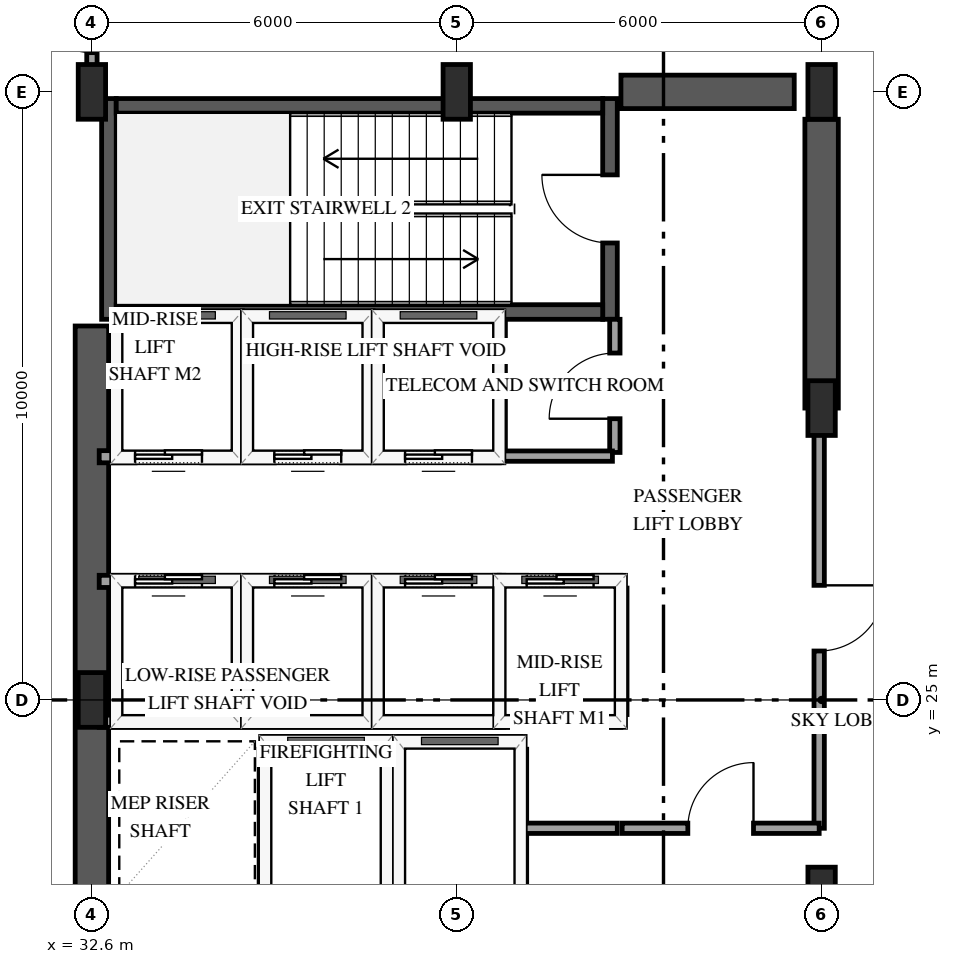
"""IFC4 building model, lengths in metres.
Left out: names, types, materials, properties, quantities, classifications, styles, units other than length and angle.
Written with IfcOpenShell. Run it as: python <this file> out.ifc"""

import sys

from ifc_helpers import new_model, si_unit, direction, frame, frame_2d, origin, origin_2d, place, context, subcontext, project, spatial, rectangle, extrude, element, fill, save


model = new_model("IFC4")
c1 = context("Model", 3, precision=1e-05, world=origin(), true_north=direction((0.0, 1.0)))
c2 = subcontext(c1, "Body", "Model", "MODEL_VIEW")
j1 = project(units=[si_unit("LENGTHUNIT", "METRE"), si_unit("PLANEANGLEUNIT", "RADIAN")], contexts=[c1])
p1 = place(None, origin())
s1 = spatial("IfcSite", under=j1, at=p1, CompositionType="ELEMENT")
p2 = place(p1, origin())
s2 = spatial("IfcBuilding", under=s1, at=p2, CompositionType="ELEMENT")
p3 = place(p2, frame((0.0, 0.0, 134.2)))
s3 = spatial("IfcBuildingStorey", under=s2, at=p3, CompositionType="ELEMENT", Elevation=134.2)
p4 = place(p3, frame((32.88, 31.26, 0.0), z_axis=(0.0, 0.0, 1.0), x_axis=(0.0, 1.0, 0.0)))
e1 = element("IfcWall", 1, at=p4, inside=s3, PredefinedType="SHEAR", context=c2, shape_type="SweptSolid", body=[
    extrude(rectangle(XDim=3.63, YDim=0.24, at=frame_2d((1.815, 0.0))), origin(), (0.0, 0.0, 1.0), 4.8),
])
p5 = place(p3, frame((41.12, 31.26, 0.0), z_axis=(0.0, 0.0, 1.0), x_axis=(0.0, 1.0, 0.0)))
e2 = element("IfcWall", 2, at=p5, inside=s3, PredefinedType="SHEAR", context=c2, shape_type="SweptSolid", body=[
    extrude(rectangle(XDim=3.63, YDim=0.24, at=frame_2d((1.815, 0.0))), origin(), (0.0, 0.0, 1.0), 4.8),
])
p6 = place(p5, frame((1.255, 0.0, 0.0)))
e3 = element("IfcOpeningElement", 3, at=p6, cuts=e2, PredefinedType="OPENING", context=c2, shape_type="SweptSolid", body=[
    extrude(rectangle(XDim=1.12, YDim=2.15, at=frame_2d((0.56, 1.075))), frame((0.0, 0.13, 0.0), z_axis=(0.0, -1.0, 0.0), x_axis=(1.0, 0.0, 0.0)), (0.0, 0.0, 1.0), 0.26),
])
for number, where, z_axis, x_axis in (
    (4, (33.0, 31.38, 0.0), (0.0, 0.0, 1.0), (1.0, 0.0, 0.0)),
    (5, (33.0, 34.77, 0.0), (0.0, 0.0, 1.0), (1.0, 0.0, 0.0)),
):
    element("IfcWall", number, at=place(p3, frame(where, z_axis=z_axis, x_axis=x_axis)), inside=s3, PredefinedType="SHEAR", context=c2, shape_type="SweptSolid", body=[
        extrude(rectangle(XDim=8.0, YDim=0.24, at=frame_2d((4.0, 0.0))), origin(), (0.0, 0.0, 1.0), 4.8),
    ])
p7 = place(p3, frame((32.6, 18.85, 0.0), z_axis=(0.0, 0.0, 1.0), x_axis=(0.0, 1.0, 0.0)))
e6 = element("IfcWall", 6, at=p7, inside=s3, PredefinedType="SHEAR", context=c2, shape_type="SweptSolid", body=[
    extrude(rectangle(XDim=12.3, YDim=0.55, at=frame_2d((6.15, 0.0))), origin(), (0.0, 0.0, 1.0), 4.8),
])
p8 = place(p3, frame((41.3, 35.0, 0.0), z_axis=(0.0, 0.0, 1.0), x_axis=(1.0, 0.0, 0.0)))
e7 = element("IfcWall", 7, at=p8, inside=s3, PredefinedType="SHEAR", context=c2, shape_type="SweptSolid", body=[
    extrude(rectangle(XDim=2.85, YDim=0.55, at=frame_2d((1.425, 0.0))), origin(), (0.0, 0.0, 1.0), 4.8),
])
p9 = place(p3, frame((44.6, 29.8, 0.0), z_axis=(0.0, 0.0, 1.0), x_axis=(0.0, 1.0, 0.0)))
e8 = element("IfcWall", 8, at=p9, inside=s3, PredefinedType="SHEAR", context=c2, shape_type="SweptSolid", body=[
    extrude(rectangle(XDim=4.75, YDim=0.55, at=frame_2d((2.375, 0.0))), origin(), (0.0, 0.0, 1.0), 4.8),
])
for number, where, z_axis, x_axis in (
    (9, (32.6, 25.0, 0.0), (0.0, 0.0, 1.0), (1.0, 0.0, 0.0)),
    (10, (32.6, 35.0, 0.0), (0.0, 0.0, 1.0), (1.0, 0.0, 0.0)),
    (11, (38.6, 35.0, 0.0), (0.0, 0.0, 1.0), (1.0, 0.0, 0.0)),
    (12, (44.6, 21.8, 0.0), (0.0, 0.0, 1.0), (1.0, 0.0, 0.0)),
    (13, (44.6, 29.8, 0.0), (0.0, 0.0, 1.0), (1.0, 0.0, 0.0)),
    (14, (44.6, 35.0, 0.0), (0.0, 0.0, 1.0), (1.0, 0.0, 0.0)),
):
    element("IfcColumn", number, at=place(p3, frame(where, z_axis=z_axis, x_axis=x_axis)), inside=s3, PredefinedType="PILASTER", context=c2, shape_type="SweptSolid", body=[
        extrude(rectangle(XDim=0.45, YDim=0.9, at=origin_2d()), origin(), (0.0, 0.0, 1.0), 4.5),
    ])
p10 = place(p3, frame((35.45, 24.3, 0.0), z_axis=(0.0, 0.0, 1.0), x_axis=(1.0, 0.0, 0.0)))
e15 = element("IfcWall", 15, at=p10, inside=s3, PredefinedType="SOLIDWALL", context=c2, shape_type="SweptSolid", body=[
    extrude(rectangle(XDim=2.0, YDim=0.2, at=frame_2d((1.0, 0.0))), origin(), (0.0, 0.0, 1.0), 4.5),
])
for number, where, z_axis, x_axis in (
    (16, (35.45, 21.81, 0.0), (0.0, 0.0, 1.0), (0.0, 1.0, 0.0)),
    (17, (37.45, 21.81, 0.0), (0.0, 0.0, 1.0), (0.0, 1.0, 0.0)),
):
    element("IfcWall", number, at=place(p3, frame(where, z_axis=z_axis, x_axis=x_axis)), inside=s3, PredefinedType="SOLIDWALL", context=c2, shape_type="SweptSolid", body=[
        extrude(rectangle(XDim=2.38, YDim=0.2, at=frame_2d((1.19, 0.0))), origin(), (0.0, 0.0, 1.0), 4.5),
    ])
p11 = place(p3, frame((37.65, 24.3, 0.0), z_axis=(0.0, 0.0, 1.0), x_axis=(1.0, 0.0, 0.0)))
e18 = element("IfcWall", 18, at=p11, inside=s3, PredefinedType="SOLIDWALL", context=c2, shape_type="SweptSolid", body=[
    extrude(rectangle(XDim=2.0, YDim=0.2, at=frame_2d((1.0, 0.0))), origin(), (0.0, 0.0, 1.0), 4.5),
])
p12 = place(p3, frame((39.65, 21.81, 0.0), z_axis=(0.0, 0.0, 1.0), x_axis=(0.0, 1.0, 0.0)))
e19 = element("IfcWall", 19, at=p12, inside=s3, PredefinedType="SOLIDWALL", context=c2, shape_type="SweptSolid", body=[
    extrude(rectangle(XDim=2.38, YDim=0.2, at=frame_2d((1.19, 0.0))), origin(), (0.0, 0.0, 1.0), 4.5),
])
p13 = place(p3, frame((32.72, 24.65, 0.0), z_axis=(0.0, 0.0, 1.0), x_axis=(1.0, 0.0, 0.0)))
e20 = element("IfcWall", 20, at=p13, inside=s3, PredefinedType="SOLIDWALL", context=c2, shape_type="SweptSolid", body=[
    extrude(rectangle(XDim=2.28, YDim=0.2, at=frame_2d((1.14, 0.0))), origin(), (0.0, 0.0, 1.0), 4.5),
])
p14 = place(p3, frame((32.72, 26.95, 0.0), z_axis=(0.0, 0.0, 1.0), x_axis=(1.0, 0.0, 0.0)))
e21 = element("IfcWall", 21, at=p14, inside=s3, PredefinedType="SOLIDWALL", context=c2, shape_type="SweptSolid", body=[
    extrude(rectangle(XDim=2.28, YDim=0.2, at=frame_2d((1.14, 0.0))), origin(), (0.0, 0.0, 1.0), 4.5),
])
p15 = place(p14, frame((0.59, 0.0, 0.0)))
e22 = element("IfcOpeningElement", 22, at=p15, cuts=e21, PredefinedType="OPENING", context=c2, shape_type="SweptSolid", body=[
    extrude(rectangle(XDim=1.1, YDim=2.15, at=frame_2d((0.55, 1.075))), frame((0.0, 0.11, 0.0), z_axis=(0.0, -1.0, 0.0), x_axis=(1.0, 0.0, 0.0)), (0.0, 0.0, 1.0), 0.22),
])
p16 = place(p3, frame((35.0, 24.76, 0.0), z_axis=(0.0, 0.0, 1.0), x_axis=(0.0, 1.0, 0.0)))
e23 = element("IfcWall", 23, at=p16, inside=s3, PredefinedType="SOLIDWALL", context=c2, shape_type="SweptSolid", body=[
    extrude(rectangle(XDim=2.08, YDim=0.2, at=frame_2d((1.04, 0.0))), origin(), (0.0, 0.0, 1.0), 4.5),
])
p17 = place(p3, frame((35.15, 24.65, 0.0), z_axis=(0.0, 0.0, 1.0), x_axis=(1.0, 0.0, 0.0)))
e24 = element("IfcWall", 24, at=p17, inside=s3, PredefinedType="SOLIDWALL", context=c2, shape_type="SweptSolid", body=[
    extrude(rectangle(XDim=2.0, YDim=0.2, at=frame_2d((1.0, 0.0))), origin(), (0.0, 0.0, 1.0), 4.5),
])
p18 = place(p3, frame((35.15, 26.95, 0.0), z_axis=(0.0, 0.0, 1.0), x_axis=(1.0, 0.0, 0.0)))
e25 = element("IfcWall", 25, at=p18, inside=s3, PredefinedType="SOLIDWALL", context=c2, shape_type="SweptSolid", body=[
    extrude(rectangle(XDim=2.0, YDim=0.2, at=frame_2d((1.0, 0.0))), origin(), (0.0, 0.0, 1.0), 4.5),
])
p19 = place(p18, frame((0.45, 0.0, 0.0)))
e26 = element("IfcOpeningElement", 26, at=p19, cuts=e25, PredefinedType="OPENING", context=c2, shape_type="SweptSolid", body=[
    extrude(rectangle(XDim=1.1, YDim=2.15, at=frame_2d((0.55, 1.075))), frame((0.0, 0.11, 0.0), z_axis=(0.0, -1.0, 0.0), x_axis=(1.0, 0.0, 0.0)), (0.0, 0.0, 1.0), 0.22),
])
p20 = place(p3, frame((37.15, 24.76, 0.0), z_axis=(0.0, 0.0, 1.0), x_axis=(0.0, 1.0, 0.0)))
e27 = element("IfcWall", 27, at=p20, inside=s3, PredefinedType="SOLIDWALL", context=c2, shape_type="SweptSolid", body=[
    extrude(rectangle(XDim=2.08, YDim=0.2, at=frame_2d((1.04, 0.0))), origin(), (0.0, 0.0, 1.0), 4.5),
])
p21 = place(p3, frame((37.3, 24.65, 0.0), z_axis=(0.0, 0.0, 1.0), x_axis=(1.0, 0.0, 0.0)))
e28 = element("IfcWall", 28, at=p21, inside=s3, PredefinedType="SOLIDWALL", context=c2, shape_type="SweptSolid", body=[
    extrude(rectangle(XDim=2.0, YDim=0.2, at=frame_2d((1.0, 0.0))), origin(), (0.0, 0.0, 1.0), 4.5),
])
p22 = place(p3, frame((37.3, 26.95, 0.0), z_axis=(0.0, 0.0, 1.0), x_axis=(1.0, 0.0, 0.0)))
e29 = element("IfcWall", 29, at=p22, inside=s3, PredefinedType="SOLIDWALL", context=c2, shape_type="SweptSolid", body=[
    extrude(rectangle(XDim=2.0, YDim=0.2, at=frame_2d((1.0, 0.0))), origin(), (0.0, 0.0, 1.0), 4.5),
])
p23 = place(p22, frame((0.45, 0.0, 0.0)))
e30 = element("IfcOpeningElement", 30, at=p23, cuts=e29, PredefinedType="OPENING", context=c2, shape_type="SweptSolid", body=[
    extrude(rectangle(XDim=1.1, YDim=2.15, at=frame_2d((0.55, 1.075))), frame((0.0, 0.11, 0.0), z_axis=(0.0, -1.0, 0.0), x_axis=(1.0, 0.0, 0.0)), (0.0, 0.0, 1.0), 0.22),
])
p24 = place(p3, frame((39.3, 24.76, 0.0), z_axis=(0.0, 0.0, 1.0), x_axis=(0.0, 1.0, 0.0)))
e31 = element("IfcWall", 31, at=p24, inside=s3, PredefinedType="SOLIDWALL", context=c2, shape_type="SweptSolid", body=[
    extrude(rectangle(XDim=2.08, YDim=0.2, at=frame_2d((1.04, 0.0))), origin(), (0.0, 0.0, 1.0), 4.5),
])
p25 = place(p3, frame((39.3, 24.65, 0.0), z_axis=(0.0, 0.0, 1.0), x_axis=(1.0, 0.0, 0.0)))
e32 = element("IfcWall", 32, at=p25, inside=s3, PredefinedType="SOLIDWALL", context=c2, shape_type="SweptSolid", body=[
    extrude(rectangle(XDim=2.0, YDim=0.2, at=frame_2d((1.0, 0.0))), origin(), (0.0, 0.0, 1.0), 4.5),
])
p26 = place(p3, frame((39.3, 26.95, 0.0), z_axis=(0.0, 0.0, 1.0), x_axis=(1.0, 0.0, 0.0)))
e33 = element("IfcWall", 33, at=p26, inside=s3, PredefinedType="SOLIDWALL", context=c2, shape_type="SweptSolid", body=[
    extrude(rectangle(XDim=2.0, YDim=0.2, at=frame_2d((1.0, 0.0))), origin(), (0.0, 0.0, 1.0), 4.5),
])
p27 = place(p26, frame((0.45, 0.0, 0.0)))
e34 = element("IfcOpeningElement", 34, at=p27, cuts=e33, PredefinedType="OPENING", context=c2, shape_type="SweptSolid", body=[
    extrude(rectangle(XDim=1.1, YDim=2.15, at=frame_2d((0.55, 1.075))), frame((0.0, 0.11, 0.0), z_axis=(0.0, -1.0, 0.0), x_axis=(1.0, 0.0, 0.0)), (0.0, 0.0, 1.0), 0.22),
])
p28 = place(p3, frame((41.3, 24.76, 0.0), z_axis=(0.0, 0.0, 1.0), x_axis=(0.0, 1.0, 0.0)))
e35 = element("IfcWall", 35, at=p28, inside=s3, PredefinedType="SOLIDWALL", context=c2, shape_type="SweptSolid", body=[
    extrude(rectangle(XDim=2.08, YDim=0.2, at=frame_2d((1.04, 0.0))), origin(), (0.0, 0.0, 1.0), 4.5),
])
p29 = place(p3, frame((32.72, 29.0, 0.0), z_axis=(0.0, 0.0, 1.0), x_axis=(1.0, 0.0, 0.0)))
e36 = element("IfcWall", 36, at=p29, inside=s3, PredefinedType="SOLIDWALL", context=c2, shape_type="SweptSolid", body=[
    extrude(rectangle(XDim=2.28, YDim=0.2, at=frame_2d((1.14, 0.0))), origin(), (0.0, 0.0, 1.0), 4.5),
])
p30 = place(p29, frame((0.59, 0.0, 0.0)))
e37 = element("IfcOpeningElement", 37, at=p30, cuts=e36, PredefinedType="OPENING", context=c2, shape_type="SweptSolid", body=[
    extrude(rectangle(XDim=1.1, YDim=2.15, at=frame_2d((0.55, 1.075))), frame((0.0, 0.11, 0.0), z_axis=(0.0, -1.0, 0.0), x_axis=(1.0, 0.0, 0.0)), (0.0, 0.0, 1.0), 0.22),
])
p31 = place(p3, frame((35.0, 29.11, 0.0), z_axis=(0.0, 0.0, 1.0), x_axis=(0.0, 1.0, 0.0)))
e38 = element("IfcWall", 38, at=p31, inside=s3, PredefinedType="SOLIDWALL", context=c2, shape_type="SweptSolid", body=[
    extrude(rectangle(XDim=2.1, YDim=0.2, at=frame_2d((1.05, 0.0))), origin(), (0.0, 0.0, 1.0), 4.5),
])
p32 = place(p3, frame((35.15, 29.0, 0.0), z_axis=(0.0, 0.0, 1.0), x_axis=(1.0, 0.0, 0.0)))
e39 = element("IfcWall", 39, at=p32, inside=s3, PredefinedType="SOLIDWALL", context=c2, shape_type="SweptSolid", body=[
    extrude(rectangle(XDim=2.0, YDim=0.2, at=frame_2d((1.0, 0.0))), origin(), (0.0, 0.0, 1.0), 4.5),
])
p33 = place(p32, frame((0.45, 0.0, 0.0)))
e40 = element("IfcOpeningElement", 40, at=p33, cuts=e39, PredefinedType="OPENING", context=c2, shape_type="SweptSolid", body=[
    extrude(rectangle(XDim=1.1, YDim=2.15, at=frame_2d((0.55, 1.075))), frame((0.0, 0.11, 0.0), z_axis=(0.0, -1.0, 0.0), x_axis=(1.0, 0.0, 0.0)), (0.0, 0.0, 1.0), 0.22),
])
p34 = place(p3, frame((37.15, 29.11, 0.0), z_axis=(0.0, 0.0, 1.0), x_axis=(0.0, 1.0, 0.0)))
e41 = element("IfcWall", 41, at=p34, inside=s3, PredefinedType="SOLIDWALL", context=c2, shape_type="SweptSolid", body=[
    extrude(rectangle(XDim=2.1, YDim=0.2, at=frame_2d((1.05, 0.0))), origin(), (0.0, 0.0, 1.0), 4.5),
])
p35 = place(p3, frame((37.3, 29.0, 0.0), z_axis=(0.0, 0.0, 1.0), x_axis=(1.0, 0.0, 0.0)))
e42 = element("IfcWall", 42, at=p35, inside=s3, PredefinedType="SOLIDWALL", context=c2, shape_type="SweptSolid", body=[
    extrude(rectangle(XDim=2.0, YDim=0.2, at=frame_2d((1.0, 0.0))), origin(), (0.0, 0.0, 1.0), 4.5),
])
p36 = place(p35, frame((0.45, 0.0, 0.0)))
e43 = element("IfcOpeningElement", 43, at=p36, cuts=e42, PredefinedType="OPENING", context=c2, shape_type="SweptSolid", body=[
    extrude(rectangle(XDim=1.1, YDim=2.15, at=frame_2d((0.55, 1.075))), frame((0.0, 0.11, 0.0), z_axis=(0.0, -1.0, 0.0), x_axis=(1.0, 0.0, 0.0)), (0.0, 0.0, 1.0), 0.22),
])
p37 = place(p3, frame((39.3, 29.11, 0.0), z_axis=(0.0, 0.0, 1.0), x_axis=(0.0, 1.0, 0.0)))
e44 = element("IfcWall", 44, at=p37, inside=s3, PredefinedType="SOLIDWALL", context=c2, shape_type="SweptSolid", body=[
    extrude(rectangle(XDim=2.1, YDim=0.2, at=frame_2d((1.05, 0.0))), origin(), (0.0, 0.0, 1.0), 4.5),
])
p38 = place(p3, frame((44.56, 29.8, 0.0), z_axis=(0.0, 0.0, 1.0), x_axis=(0.0, -1.0, 0.0)))
e45 = element("IfcWall", 45, at=p38, inside=s3, PredefinedType="PARTITIONING", context=c2, shape_type="SweptSolid", body=[
    extrude(rectangle(XDim=6.91, YDim=0.17, at=frame_2d((3.455, 0.0))), origin(), (0.0, 0.0, 1.0), 3.54),
])
p39 = place(p38, frame((2.915, 0.0, 0.0)))
e46 = element("IfcOpeningElement", 46, at=p39, cuts=e45, PredefinedType="OPENING", context=c2, shape_type="SweptSolid", body=[
    extrude(rectangle(XDim=1.08, YDim=2.15, at=frame_2d((0.54, 1.075))), frame((0.0, 0.095, 0.0), z_axis=(0.0, -1.0, 0.0), x_axis=(1.0, 0.0, 0.0)), (0.0, 0.0, 1.0), 0.19),
])
p40 = place(p3, frame((41.32, 22.89, 0.0), z_axis=(0.0, 0.0, 1.0), x_axis=(1.0, 0.0, 0.0)))
e47 = element("IfcWall", 47, at=p40, inside=s3, PredefinedType="PARTITIONING", context=c2, shape_type="SweptSolid", body=[
    extrude(rectangle(XDim=3.24, YDim=0.17, at=frame_2d((1.62, 0.0))), origin(), (0.0, 0.0, 1.0), 4.5),
])
p41 = place(p40, frame((1.08, 0.0, 0.0)))
e48 = element("IfcOpeningElement", 48, at=p41, cuts=e47, PredefinedType="OPENING", context=c2, shape_type="SweptSolid", body=[
    extrude(rectangle(XDim=1.08, YDim=2.15, at=frame_2d((0.54, 1.075))), frame((0.0, 0.095, 0.0), z_axis=(0.0, -1.0, 0.0), x_axis=(1.0, 0.0, 0.0)), (0.0, 0.0, 1.0), 0.19),
])
p42 = place(p3, frame((41.2, 29.07, 0.0), z_axis=(0.0, 0.0, 1.0), x_axis=(0.0, 1.0, 0.0)))
e49 = element("IfcWall", 49, at=p42, inside=s3, PredefinedType="PARTITIONING", context=c2, shape_type="SweptSolid", body=[
    extrude(rectangle(XDim=2.19, YDim=0.17, at=frame_2d((1.095, 0.0))), origin(), (0.0, 0.0, 1.0), 4.5),
])
p43 = place(p42, frame((0.555, 0.0, 0.0)))
e50 = element("IfcOpeningElement", 50, at=p43, cuts=e49, PredefinedType="OPENING", context=c2, shape_type="SweptSolid", body=[
    extrude(rectangle(XDim=1.08, YDim=2.15, at=frame_2d((0.54, 1.075))), frame((0.0, 0.095, 0.0), z_axis=(0.0, -1.0, 0.0), x_axis=(1.0, 0.0, 0.0)), (0.0, 0.0, 1.0), 0.19),
])
p44 = place(p3, frame((32.6, 35.07, 0.0), z_axis=(0.0, 0.0, 1.0), x_axis=(0.0, 1.0, 0.0)))
e51 = element("IfcWall", 51, at=p44, inside=s3, PredefinedType="PARTITIONING", context=c2, shape_type="SweptSolid", body=[
    extrude(rectangle(XDim=1.91, YDim=0.17, at=frame_2d((0.955, 0.0))), origin(), (0.0, 0.0, 1.0), 4.5),
])
p45 = place(p44, frame((0.575, 0.0, 0.0)))
e52 = element("IfcOpeningElement", 52, at=p45, cuts=e51, PredefinedType="OPENING", context=c2, shape_type="SweptSolid", body=[
    extrude(rectangle(XDim=0.98, YDim=2.15, at=frame_2d((0.49, 1.075))), frame((0.0, 0.095, 0.0), z_axis=(0.0, -1.0, 0.0), x_axis=(1.0, 0.0, 0.0)), (0.0, 0.0, 1.0), 0.19),
])
p46 = place(p3, frame((39.3, 29.01, 0.0), z_axis=(0.0, 0.0, 1.0), x_axis=(1.0, 0.0, 0.0)))
e53 = element("IfcWall", 53, at=p46, inside=s3, PredefinedType="PARTITIONING", context=c2, shape_type="SweptSolid", body=[
    extrude(rectangle(XDim=1.86, YDim=0.17, at=frame_2d((0.93, 0.0))), origin(), (0.0, 0.0, 1.0), 4.5),
])
p47 = place(p3, frame((39.72, 22.89, 0.0), z_axis=(0.0, 0.0, 1.0), x_axis=(1.0, 0.0, 0.0)))
e54 = element("IfcWall", 54, at=p47, inside=s3, PredefinedType="PARTITIONING", context=c2, shape_type="SweptSolid", body=[
    extrude(rectangle(XDim=1.52, YDim=0.17, at=frame_2d((0.76, 0.0))), origin(), (0.0, 0.0, 1.0), 4.5),
])
p48 = place(p15, origin())
e55 = element("IfcDoor", 55, at=p48, inside=s3, OperationType="SLIDING_TO_LEFT", PredefinedType="DOOR", context=c2, shape_type="SweptSolid", body=[
    extrude(rectangle(XDim=1.1, YDim=2.15, at=frame_2d((0.55, 1.075))), frame((0.0, 0.025, 0.0), z_axis=(0.0, -1.0, 0.0), x_axis=(1.0, 0.0, 0.0)), (0.0, 0.0, 1.0), 0.05),
])
fill(e22, e55)
p49 = place(p19, origin())
e56 = element("IfcDoor", 56, at=p49, inside=s3, OperationType="SLIDING_TO_LEFT", PredefinedType="DOOR", context=c2, shape_type="SweptSolid", body=[
    extrude(rectangle(XDim=1.1, YDim=2.15, at=frame_2d((0.55, 1.075))), frame((0.0, 0.025, 0.0), z_axis=(0.0, -1.0, 0.0), x_axis=(1.0, 0.0, 0.0)), (0.0, 0.0, 1.0), 0.05),
])
fill(e26, e56)
p50 = place(p23, origin())
e57 = element("IfcDoor", 57, at=p50, inside=s3, OperationType="SLIDING_TO_LEFT", PredefinedType="DOOR", context=c2, shape_type="SweptSolid", body=[
    extrude(rectangle(XDim=1.1, YDim=2.15, at=frame_2d((0.55, 1.075))), frame((0.0, 0.025, 0.0), z_axis=(0.0, -1.0, 0.0), x_axis=(1.0, 0.0, 0.0)), (0.0, 0.0, 1.0), 0.05),
])
fill(e30, e57)
p51 = place(p27, origin())
e58 = element("IfcDoor", 58, at=p51, inside=s3, OperationType="SLIDING_TO_LEFT", PredefinedType="DOOR", context=c2, shape_type="SweptSolid", body=[
    extrude(rectangle(XDim=1.1, YDim=2.15, at=frame_2d((0.55, 1.075))), frame((0.0, 0.025, 0.0), z_axis=(0.0, -1.0, 0.0), x_axis=(1.0, 0.0, 0.0)), (0.0, 0.0, 1.0), 0.05),
])
fill(e34, e58)
p52 = place(p30, origin())
e59 = element("IfcDoor", 59, at=p52, inside=s3, OperationType="SLIDING_TO_LEFT", PredefinedType="DOOR", context=c2, shape_type="SweptSolid", body=[
    extrude(rectangle(XDim=1.1, YDim=2.15, at=frame_2d((0.55, 1.075))), frame((0.0, 0.025, 0.0), z_axis=(0.0, -1.0, 0.0), x_axis=(1.0, 0.0, 0.0)), (0.0, 0.0, 1.0), 0.05),
])
fill(e37, e59)
p53 = place(p33, origin())
e60 = element("IfcDoor", 60, at=p53, inside=s3, OperationType="SLIDING_TO_LEFT", PredefinedType="DOOR", context=c2, shape_type="SweptSolid", body=[
    extrude(rectangle(XDim=1.1, YDim=2.15, at=frame_2d((0.55, 1.075))), frame((0.0, 0.025, 0.0), z_axis=(0.0, -1.0, 0.0), x_axis=(1.0, 0.0, 0.0)), (0.0, 0.0, 1.0), 0.05),
])
fill(e40, e60)
p54 = place(p36, origin())
e61 = element("IfcDoor", 61, at=p54, inside=s3, OperationType="SLIDING_TO_LEFT", PredefinedType="DOOR", context=c2, shape_type="SweptSolid", body=[
    extrude(rectangle(XDim=1.1, YDim=2.15, at=frame_2d((0.55, 1.075))), frame((0.0, 0.025, 0.0), z_axis=(0.0, -1.0, 0.0), x_axis=(1.0, 0.0, 0.0)), (0.0, 0.0, 1.0), 0.05),
])
fill(e43, e61)
p55 = place(p6, origin())
e62 = element("IfcDoor", 62, at=p55, inside=s3, OperationType="SINGLE_SWING_RIGHT", PredefinedType="DOOR", context=c2, shape_type="SweptSolid", body=[
    extrude(rectangle(XDim=1.12, YDim=2.15, at=frame_2d((0.56, 1.075))), frame((0.0, 0.025, 0.0), z_axis=(0.0, -1.0, 0.0), x_axis=(1.0, 0.0, 0.0)), (0.0, 0.0, 1.0), 0.05),
])
fill(e3, e62)
p56 = place(p39, origin())
e63 = element("IfcDoor", 63, at=p56, inside=s3, OperationType="SINGLE_SWING_LEFT", PredefinedType="DOOR", context=c2, shape_type="SweptSolid", body=[
    extrude(rectangle(XDim=1.08, YDim=2.15, at=frame_2d((0.54, 1.075))), frame((0.0, 0.025, 0.0), z_axis=(0.0, -1.0, 0.0), x_axis=(1.0, 0.0, 0.0)), (0.0, 0.0, 1.0), 0.05),
])
fill(e46, e63)
p57 = place(p41, origin())
e64 = element("IfcDoor", 64, at=p57, inside=s3, OperationType="SINGLE_SWING_RIGHT", PredefinedType="DOOR", context=c2, shape_type="SweptSolid", body=[
    extrude(rectangle(XDim=1.08, YDim=2.15, at=frame_2d((0.54, 1.075))), frame((0.0, 0.025, 0.0), z_axis=(0.0, -1.0, 0.0), x_axis=(1.0, 0.0, 0.0)), (0.0, 0.0, 1.0), 0.05),
])
fill(e48, e64)
p58 = place(p43, origin())
e65 = element("IfcDoor", 65, at=p58, inside=s3, OperationType="SINGLE_SWING_LEFT", PredefinedType="DOOR", context=c2, shape_type="SweptSolid", body=[
    extrude(rectangle(XDim=1.08, YDim=2.15, at=frame_2d((0.54, 1.075))), frame((0.0, 0.025, 0.0), z_axis=(0.0, -1.0, 0.0), x_axis=(1.0, 0.0, 0.0)), (0.0, 0.0, 1.0), 0.05),
])
fill(e50, e65)
p59 = place(p45, origin())
e66 = element("IfcDoor", 66, at=p59, inside=s3, OperationType="SINGLE_SWING_RIGHT", PredefinedType="DOOR", context=c2, shape_type="SweptSolid", body=[
    extrude(rectangle(XDim=0.98, YDim=2.15, at=frame_2d((0.49, 1.075))), frame((0.0, 0.025, 0.0), z_axis=(0.0, -1.0, 0.0), x_axis=(1.0, 0.0, 0.0)), (0.0, 0.0, 1.0), 0.05),
])
fill(e52, e66)
save(model, sys.argv[1])
